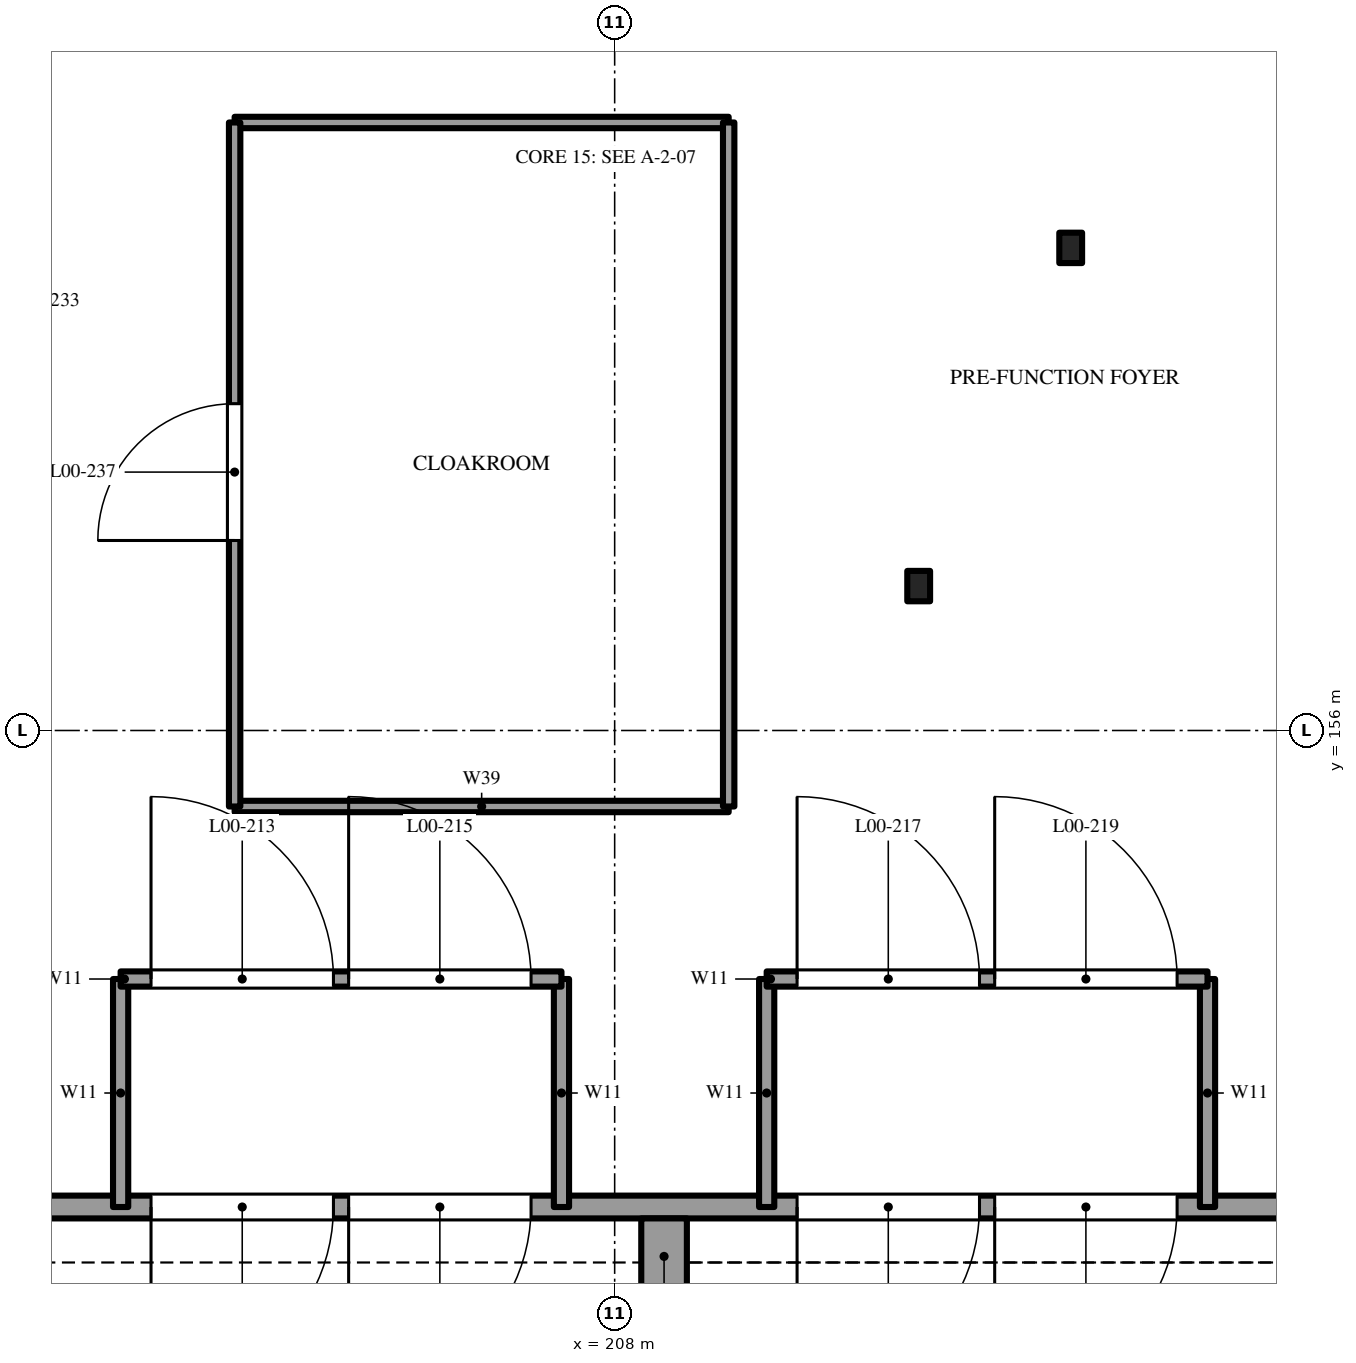
"""IFC4 building model, lengths in metres.
Left out: names, types, materials, properties, quantities, classifications, styles, units other than length and angle.
Written with IfcOpenShell. Run it as: python <this file> out.ifc"""

import sys

from ifc_helpers import new_model, si_unit, direction, frame, frame_2d, origin, origin_2d, place, context, subcontext, project, spatial, rectangle, i_section, extrude, element, fill, save


model = new_model("IFC4")
c1 = context("Model", 3, precision=1e-05, world=origin(), true_north=direction((0.0, 1.0)))
c2 = subcontext(c1, "Body", "Model", "MODEL_VIEW")
j1 = project(units=[si_unit("LENGTHUNIT", "METRE"), si_unit("PLANEANGLEUNIT", "RADIAN")], contexts=[c1])
p1 = place(None, origin())
s1 = spatial("IfcSite", under=j1, at=p1, CompositionType="ELEMENT")
p2 = place(p1, origin())
s2 = spatial("IfcBuilding", under=s1, at=p2, CompositionType="ELEMENT")
p3 = place(p2, origin())
s3 = spatial("IfcBuildingStorey", under=s2, at=p3, CompositionType="ELEMENT", Elevation=0.0)
p4 = place(p3, frame((229.664, 156.311, -0.3), z_axis=(0.0, 0.0, 1.0), x_axis=(-0.587784977279, 0.809017194184, 0.0)))
e1 = element("IfcWall", 1, at=p4, inside=s3, PredefinedType="SOLIDWALL", context=c2, shape_type="SweptSolid", body=[
    extrude(rectangle(XDim=53.5, YDim=0.4, at=frame_2d((26.75, 0.0))), origin(), (0.0, 0.0, 1.0), 7.5),
])
p5 = place(p4, frame((13.3, 0.0, 0.3)))
e2 = element("IfcOpeningElement", 2, at=p5, cuts=e1, PredefinedType="OPENING", context=c2, shape_type="SweptSolid", body=[
    extrude(rectangle(XDim=2.4, YDim=2.4, at=frame_2d((1.2, 1.2))), frame((0.0, 0.21, 0.0), z_axis=(0.0, -1.0, 0.0), x_axis=(1.0, 0.0, 0.0)), (0.0, 0.0, 1.0), 0.42),
])
p6 = place(p4, frame((16.8, 0.0, 0.3)))
e3 = element("IfcOpeningElement", 3, at=p6, cuts=e1, PredefinedType="OPENING", context=c2, shape_type="SweptSolid", body=[
    extrude(rectangle(XDim=2.4, YDim=2.4, at=frame_2d((1.2, 1.2))), frame((0.0, 0.21, 0.0), z_axis=(0.0, -1.0, 0.0), x_axis=(1.0, 0.0, 0.0)), (0.0, 0.0, 1.0), 0.42),
])
p7 = place(p4, frame((20.3, 0.0, 0.3)))
e4 = element("IfcOpeningElement", 4, at=p7, cuts=e1, PredefinedType="OPENING", context=c2, shape_type="SweptSolid", body=[
    extrude(rectangle(XDim=2.4, YDim=2.4, at=frame_2d((1.2, 1.2))), frame((0.0, 0.21, 0.0), z_axis=(0.0, -1.0, 0.0), x_axis=(1.0, 0.0, 0.0)), (0.0, 0.0, 1.0), 0.42),
])
p8 = place(p4, frame((23.8, 0.0, 0.3)))
e5 = element("IfcOpeningElement", 5, at=p8, cuts=e1, PredefinedType="OPENING", context=c2, shape_type="SweptSolid", body=[
    extrude(rectangle(XDim=2.4, YDim=2.4, at=frame_2d((1.2, 1.2))), frame((0.0, 0.21, 0.0), z_axis=(0.0, -1.0, 0.0), x_axis=(1.0, 0.0, 0.0)), (0.0, 0.0, 1.0), 0.42),
])
p9 = place(p4, frame((27.3, 0.0, 0.3)))
e6 = element("IfcOpeningElement", 6, at=p9, cuts=e1, PredefinedType="OPENING", context=c2, shape_type="SweptSolid", body=[
    extrude(rectangle(XDim=2.4, YDim=2.4, at=frame_2d((1.2, 1.2))), frame((0.0, 0.21, 0.0), z_axis=(0.0, -1.0, 0.0), x_axis=(1.0, 0.0, 0.0)), (0.0, 0.0, 1.0), 0.42),
])
p10 = place(p4, frame((30.8, 0.0, 0.3)))
e7 = element("IfcOpeningElement", 7, at=p10, cuts=e1, PredefinedType="OPENING", context=c2, shape_type="SweptSolid", body=[
    extrude(rectangle(XDim=2.4, YDim=2.4, at=frame_2d((1.2, 1.2))), frame((0.0, 0.21, 0.0), z_axis=(0.0, -1.0, 0.0), x_axis=(1.0, 0.0, 0.0)), (0.0, 0.0, 1.0), 0.42),
])
p11 = place(p4, frame((34.3, 0.0, 0.3)))
e8 = element("IfcOpeningElement", 8, at=p11, cuts=e1, PredefinedType="OPENING", context=c2, shape_type="SweptSolid", body=[
    extrude(rectangle(XDim=2.4, YDim=2.4, at=frame_2d((1.2, 1.2))), frame((0.0, 0.21, 0.0), z_axis=(0.0, -1.0, 0.0), x_axis=(1.0, 0.0, 0.0)), (0.0, 0.0, 1.0), 0.42),
])
p12 = place(p4, frame((37.8, 0.0, 0.3)))
e9 = element("IfcOpeningElement", 9, at=p12, cuts=e1, PredefinedType="OPENING", context=c2, shape_type="SweptSolid", body=[
    extrude(rectangle(XDim=2.4, YDim=2.4, at=frame_2d((1.2, 1.2))), frame((0.0, 0.21, 0.0), z_axis=(0.0, -1.0, 0.0), x_axis=(1.0, 0.0, 0.0)), (0.0, 0.0, 1.0), 0.42),
])
for number, where, z_axis, x_axis in (
    (10, (212.0, 157.9, -0.3), (0.0, 0.0, 1.0), (1.0, 0.0, 0.0)),
    (11, (214.0, 162.35, -0.3), (0.0, 0.0, 1.0), (1.0, 0.0, 0.0)),
):
    element("IfcColumn", number, at=place(p3, frame(where, z_axis=z_axis, x_axis=x_axis)), inside=s3, PredefinedType="COLUMN", context=c2, shape_type="SweptSolid", body=[
        extrude(i_section(OverallWidth=0.3, OverallDepth=0.4, WebThickness=0.013, FlangeThickness=0.024, FilletRadius=0.027, at=origin_2d()), origin(), (0.0, 0.0, 1.0), 7.5),
    ])
p13 = place(p3, frame((190.0, 149.73, -0.3), z_axis=(0.0, 0.0, 1.0), x_axis=(1.0, 0.0, 0.0)))
e12 = element("IfcWall", 12, at=p13, inside=s3, PredefinedType="SOLIDWALL", context=c2, shape_type="SweptSolid", body=[
    extrude(rectangle(XDim=28.0, YDim=0.3, at=frame_2d((14.0, 0.0))), origin(), (0.0, 0.0, 1.0), 7.5),
])
p14 = place(p13, frame((2.9, 0.0, 0.3)))
e13 = element("IfcOpeningElement", 13, at=p14, cuts=e12, PredefinedType="OPENING", context=c2, shape_type="SweptSolid", body=[
    extrude(rectangle(XDim=2.4, YDim=2.4, at=frame_2d((1.2, 1.2))), frame((0.0, 0.16, 0.0), z_axis=(0.0, -1.0, 0.0), x_axis=(1.0, 0.0, 0.0)), (0.0, 0.0, 1.0), 0.32),
])
p15 = place(p13, frame((5.5, 0.0, 0.3)))
e14 = element("IfcOpeningElement", 14, at=p15, cuts=e12, PredefinedType="OPENING", context=c2, shape_type="SweptSolid", body=[
    extrude(rectangle(XDim=2.4, YDim=2.4, at=frame_2d((1.2, 1.2))), frame((0.0, 0.16, 0.0), z_axis=(0.0, -1.0, 0.0), x_axis=(1.0, 0.0, 0.0)), (0.0, 0.0, 1.0), 0.32),
])
p16 = place(p13, frame((11.9, 0.0, 0.3)))
e15 = element("IfcOpeningElement", 15, at=p16, cuts=e12, PredefinedType="OPENING", context=c2, shape_type="SweptSolid", body=[
    extrude(rectangle(XDim=2.4, YDim=2.4, at=frame_2d((1.2, 1.2))), frame((0.0, 0.16, 0.0), z_axis=(0.0, -1.0, 0.0), x_axis=(1.0, 0.0, 0.0)), (0.0, 0.0, 1.0), 0.32),
])
p17 = place(p13, frame((14.5, 0.0, 0.3)))
e16 = element("IfcOpeningElement", 16, at=p17, cuts=e12, PredefinedType="OPENING", context=c2, shape_type="SweptSolid", body=[
    extrude(rectangle(XDim=2.4, YDim=2.4, at=frame_2d((1.2, 1.2))), frame((0.0, 0.16, 0.0), z_axis=(0.0, -1.0, 0.0), x_axis=(1.0, 0.0, 0.0)), (0.0, 0.0, 1.0), 0.32),
])
p18 = place(p13, frame((20.4, 0.0, 0.3)))
e17 = element("IfcOpeningElement", 17, at=p18, cuts=e12, PredefinedType="OPENING", context=c2, shape_type="SweptSolid", body=[
    extrude(rectangle(XDim=2.4, YDim=2.4, at=frame_2d((1.2, 1.2))), frame((0.0, 0.16, 0.0), z_axis=(0.0, -1.0, 0.0), x_axis=(1.0, 0.0, 0.0)), (0.0, 0.0, 1.0), 0.32),
])
p19 = place(p13, frame((23.0, 0.0, 0.3)))
e18 = element("IfcOpeningElement", 18, at=p19, cuts=e12, PredefinedType="OPENING", context=c2, shape_type="SweptSolid", body=[
    extrude(rectangle(XDim=2.4, YDim=2.4, at=frame_2d((1.2, 1.2))), frame((0.0, 0.16, 0.0), z_axis=(0.0, -1.0, 0.0), x_axis=(1.0, 0.0, 0.0)), (0.0, 0.0, 1.0), 0.32),
])
p20 = place(p3, frame((208.65, 149.58, -0.3), z_axis=(0.0, 0.0, 1.0), x_axis=(0.0, -1.0, 0.0)))
e19 = element("IfcWall", 19, at=p20, inside=s3, PredefinedType="SOLIDWALL", context=c2, shape_type="SweptSolid", body=[
    extrude(rectangle(XDim=1.0, YDim=0.6, at=frame_2d((0.5, 0.0))), origin(), (0.0, 0.0, 1.0), 7.5),
])
for number, where, z_axis, x_axis in (
    (20, (201.5, 149.73, 0.0), (0.0, 0.0, 1.0), (0.0, 1.0, 0.0)),
    (21, (207.3, 149.73, 0.0), (0.0, 0.0, 1.0), (0.0, 1.0, 0.0)),
):
    element("IfcWall", number, at=place(p3, frame(where, z_axis=z_axis, x_axis=x_axis)), inside=s3, PredefinedType="SOLIDWALL", context=c2, shape_type="SweptSolid", body=[
        extrude(rectangle(XDim=3.0, YDim=0.2, at=frame_2d((1.5, 0.0))), origin(), (0.0, 0.0, 1.0), 3.2),
    ])
p21 = place(p3, frame((201.5, 152.73, 0.0), z_axis=(0.0, 0.0, 1.0), x_axis=(1.0, 0.0, 0.0)))
e22 = element("IfcWall", 22, at=p21, inside=s3, PredefinedType="SOLIDWALL", context=c2, shape_type="SweptSolid", body=[
    extrude(rectangle(XDim=5.8, YDim=0.2, at=frame_2d((2.9, 0.0))), origin(), (0.0, 0.0, 1.0), 3.2),
])
p22 = place(p21, frame((0.4, 0.0, 0.0)))
e23 = element("IfcOpeningElement", 23, at=p22, cuts=e22, PredefinedType="OPENING", context=c2, shape_type="SweptSolid", body=[
    extrude(rectangle(XDim=2.4, YDim=2.4, at=frame_2d((1.2, 1.2))), frame((0.0, 0.11, 0.0), z_axis=(0.0, -1.0, 0.0), x_axis=(1.0, 0.0, 0.0)), (0.0, 0.0, 1.0), 0.22),
])
p23 = place(p21, frame((3.0, 0.0, 0.0)))
e24 = element("IfcOpeningElement", 24, at=p23, cuts=e22, PredefinedType="OPENING", context=c2, shape_type="SweptSolid", body=[
    extrude(rectangle(XDim=2.4, YDim=2.4, at=frame_2d((1.2, 1.2))), frame((0.0, 0.11, 0.0), z_axis=(0.0, -1.0, 0.0), x_axis=(1.0, 0.0, 0.0)), (0.0, 0.0, 1.0), 0.22),
])
for number, where, z_axis, x_axis in (
    (25, (210.0, 149.73, 0.0), (0.0, 0.0, 1.0), (0.0, 1.0, 0.0)),
    (26, (215.8, 149.73, 0.0), (0.0, 0.0, 1.0), (0.0, 1.0, 0.0)),
):
    element("IfcWall", number, at=place(p3, frame(where, z_axis=z_axis, x_axis=x_axis)), inside=s3, PredefinedType="SOLIDWALL", context=c2, shape_type="SweptSolid", body=[
        extrude(rectangle(XDim=3.0, YDim=0.2, at=frame_2d((1.5, 0.0))), origin(), (0.0, 0.0, 1.0), 3.2),
    ])
p24 = place(p3, frame((210.0, 152.73, 0.0), z_axis=(0.0, 0.0, 1.0), x_axis=(1.0, 0.0, 0.0)))
e27 = element("IfcWall", 27, at=p24, inside=s3, PredefinedType="SOLIDWALL", context=c2, shape_type="SweptSolid", body=[
    extrude(rectangle(XDim=5.8, YDim=0.2, at=frame_2d((2.9, 0.0))), origin(), (0.0, 0.0, 1.0), 3.2),
])
p25 = place(p24, frame((0.4, 0.0, 0.0)))
e28 = element("IfcOpeningElement", 28, at=p25, cuts=e27, PredefinedType="OPENING", context=c2, shape_type="SweptSolid", body=[
    extrude(rectangle(XDim=2.4, YDim=2.4, at=frame_2d((1.2, 1.2))), frame((0.0, 0.11, 0.0), z_axis=(0.0, -1.0, 0.0), x_axis=(1.0, 0.0, 0.0)), (0.0, 0.0, 1.0), 0.22),
])
p26 = place(p24, frame((3.0, 0.0, 0.0)))
e29 = element("IfcOpeningElement", 29, at=p26, cuts=e27, PredefinedType="OPENING", context=c2, shape_type="SweptSolid", body=[
    extrude(rectangle(XDim=2.4, YDim=2.4, at=frame_2d((1.2, 1.2))), frame((0.0, 0.11, 0.0), z_axis=(0.0, -1.0, 0.0), x_axis=(1.0, 0.0, 0.0)), (0.0, 0.0, 1.0), 0.22),
])
for number, where, z_axis, x_axis in (
    (30, (203.0, 155.0, 0.0), (0.0, 0.0, 1.0), (1.0, 0.0, 0.0)),
    (31, (203.0, 164.0, 0.0), (0.0, 0.0, 1.0), (1.0, 0.0, 0.0)),
):
    element("IfcWall", number, at=place(p3, frame(where, z_axis=z_axis, x_axis=x_axis)), inside=s3, PredefinedType="PARTITIONING", context=c2, shape_type="SweptSolid", body=[
        extrude(rectangle(XDim=6.5, YDim=0.15, at=frame_2d((3.25, 0.0))), origin(), (0.0, 0.0, 1.0), 6.85),
    ])
p27 = place(p3, frame((203.0, 155.0, 0.0), z_axis=(0.0, 0.0, 1.0), x_axis=(0.0, 1.0, 0.0)))
e32 = element("IfcWall", 32, at=p27, inside=s3, PredefinedType="PARTITIONING", context=c2, shape_type="SweptSolid", body=[
    extrude(rectangle(XDim=9.0, YDim=0.15, at=frame_2d((4.5, 0.0))), origin(), (0.0, 0.0, 1.0), 6.85),
])
p28 = place(p27, frame((3.5, 0.0, 0.0)))
e33 = element("IfcOpeningElement", 33, at=p28, cuts=e32, PredefinedType="OPENING", context=c2, shape_type="SweptSolid", body=[
    extrude(rectangle(XDim=1.8, YDim=2.1, at=frame_2d((0.9, 1.05))), frame((0.0, 0.085, 0.0), z_axis=(0.0, -1.0, 0.0), x_axis=(1.0, 0.0, 0.0)), (0.0, 0.0, 1.0), 0.17),
])
p29 = place(p3, frame((209.5, 155.0, 0.0), z_axis=(0.0, 0.0, 1.0), x_axis=(0.0, 1.0, 0.0)))
e34 = element("IfcWall", 34, at=p29, inside=s3, PredefinedType="PARTITIONING", context=c2, shape_type="SweptSolid", body=[
    extrude(rectangle(XDim=9.0, YDim=0.15, at=frame_2d((4.5, 0.0))), origin(), (0.0, 0.0, 1.0), 6.85),
])
p30 = place(p16, frame((2.4, 0.0, 0.0), z_axis=(0.0, 0.0, 1.0), x_axis=(-1.0, 0.0, 0.0)))
e35 = element("IfcDoor", 35, at=p30, inside=s3, OperationType="DOUBLE_DOOR_SINGLE_SWING", PredefinedType="DOOR", context=c2, shape_type="SweptSolid", body=[
    extrude(rectangle(XDim=2.4, YDim=2.4, at=frame_2d((1.2, 1.2))), frame((0.0, 0.025, 0.0), z_axis=(0.0, -1.0, 0.0), x_axis=(1.0, 0.0, 0.0)), (0.0, 0.0, 1.0), 0.05),
])
fill(e15, e35)
p31 = place(p22, origin())
e36 = element("IfcDoor", 36, at=p31, inside=s3, OperationType="DOUBLE_DOOR_SINGLE_SWING", PredefinedType="DOOR", context=c2, shape_type="SweptSolid", body=[
    extrude(rectangle(XDim=2.4, YDim=2.4, at=frame_2d((1.2, 1.2))), frame((0.0, 0.025, 0.0), z_axis=(0.0, -1.0, 0.0), x_axis=(1.0, 0.0, 0.0)), (0.0, 0.0, 1.0), 0.05),
])
fill(e23, e36)
p32 = place(p17, frame((2.4, 0.0, 0.0), z_axis=(0.0, 0.0, 1.0), x_axis=(-1.0, 0.0, 0.0)))
e37 = element("IfcDoor", 37, at=p32, inside=s3, OperationType="DOUBLE_DOOR_SINGLE_SWING", PredefinedType="DOOR", context=c2, shape_type="SweptSolid", body=[
    extrude(rectangle(XDim=2.4, YDim=2.4, at=frame_2d((1.2, 1.2))), frame((0.0, 0.025, 0.0), z_axis=(0.0, -1.0, 0.0), x_axis=(1.0, 0.0, 0.0)), (0.0, 0.0, 1.0), 0.05),
])
fill(e16, e37)
p33 = place(p23, origin())
e38 = element("IfcDoor", 38, at=p33, inside=s3, OperationType="DOUBLE_DOOR_SINGLE_SWING", PredefinedType="DOOR", context=c2, shape_type="SweptSolid", body=[
    extrude(rectangle(XDim=2.4, YDim=2.4, at=frame_2d((1.2, 1.2))), frame((0.0, 0.025, 0.0), z_axis=(0.0, -1.0, 0.0), x_axis=(1.0, 0.0, 0.0)), (0.0, 0.0, 1.0), 0.05),
])
fill(e24, e38)
p34 = place(p18, frame((2.4, 0.0, 0.0), z_axis=(0.0, 0.0, 1.0), x_axis=(-1.0, 0.0, 0.0)))
e39 = element("IfcDoor", 39, at=p34, inside=s3, OperationType="DOUBLE_DOOR_SINGLE_SWING", PredefinedType="DOOR", context=c2, shape_type="SweptSolid", body=[
    extrude(rectangle(XDim=2.4, YDim=2.4, at=frame_2d((1.2, 1.2))), frame((0.0, 0.025, 0.0), z_axis=(0.0, -1.0, 0.0), x_axis=(1.0, 0.0, 0.0)), (0.0, 0.0, 1.0), 0.05),
])
fill(e17, e39)
p35 = place(p25, origin())
e40 = element("IfcDoor", 40, at=p35, inside=s3, OperationType="DOUBLE_DOOR_SINGLE_SWING", PredefinedType="DOOR", context=c2, shape_type="SweptSolid", body=[
    extrude(rectangle(XDim=2.4, YDim=2.4, at=frame_2d((1.2, 1.2))), frame((0.0, 0.025, 0.0), z_axis=(0.0, -1.0, 0.0), x_axis=(1.0, 0.0, 0.0)), (0.0, 0.0, 1.0), 0.05),
])
fill(e28, e40)
p36 = place(p19, frame((2.4, 0.0, 0.0), z_axis=(0.0, 0.0, 1.0), x_axis=(-1.0, 0.0, 0.0)))
e41 = element("IfcDoor", 41, at=p36, inside=s3, OperationType="DOUBLE_DOOR_SINGLE_SWING", PredefinedType="DOOR", context=c2, shape_type="SweptSolid", body=[
    extrude(rectangle(XDim=2.4, YDim=2.4, at=frame_2d((1.2, 1.2))), frame((0.0, 0.025, 0.0), z_axis=(0.0, -1.0, 0.0), x_axis=(1.0, 0.0, 0.0)), (0.0, 0.0, 1.0), 0.05),
])
fill(e18, e41)
p37 = place(p26, origin())
e42 = element("IfcDoor", 42, at=p37, inside=s3, OperationType="DOUBLE_DOOR_SINGLE_SWING", PredefinedType="DOOR", context=c2, shape_type="SweptSolid", body=[
    extrude(rectangle(XDim=2.4, YDim=2.4, at=frame_2d((1.2, 1.2))), frame((0.0, 0.025, 0.0), z_axis=(0.0, -1.0, 0.0), x_axis=(1.0, 0.0, 0.0)), (0.0, 0.0, 1.0), 0.05),
])
fill(e29, e42)
p38 = place(p28, origin())
e43 = element("IfcDoor", 43, at=p38, inside=s3, OperationType="DOUBLE_DOOR_SINGLE_SWING", PredefinedType="DOOR", context=c2, shape_type="SweptSolid", body=[
    extrude(rectangle(XDim=1.8, YDim=2.1, at=frame_2d((0.9, 1.05))), frame((0.0, 0.025, 0.0), z_axis=(0.0, -1.0, 0.0), x_axis=(1.0, 0.0, 0.0)), (0.0, 0.0, 1.0), 0.05),
])
fill(e33, e43)
save(model, sys.argv[1])
